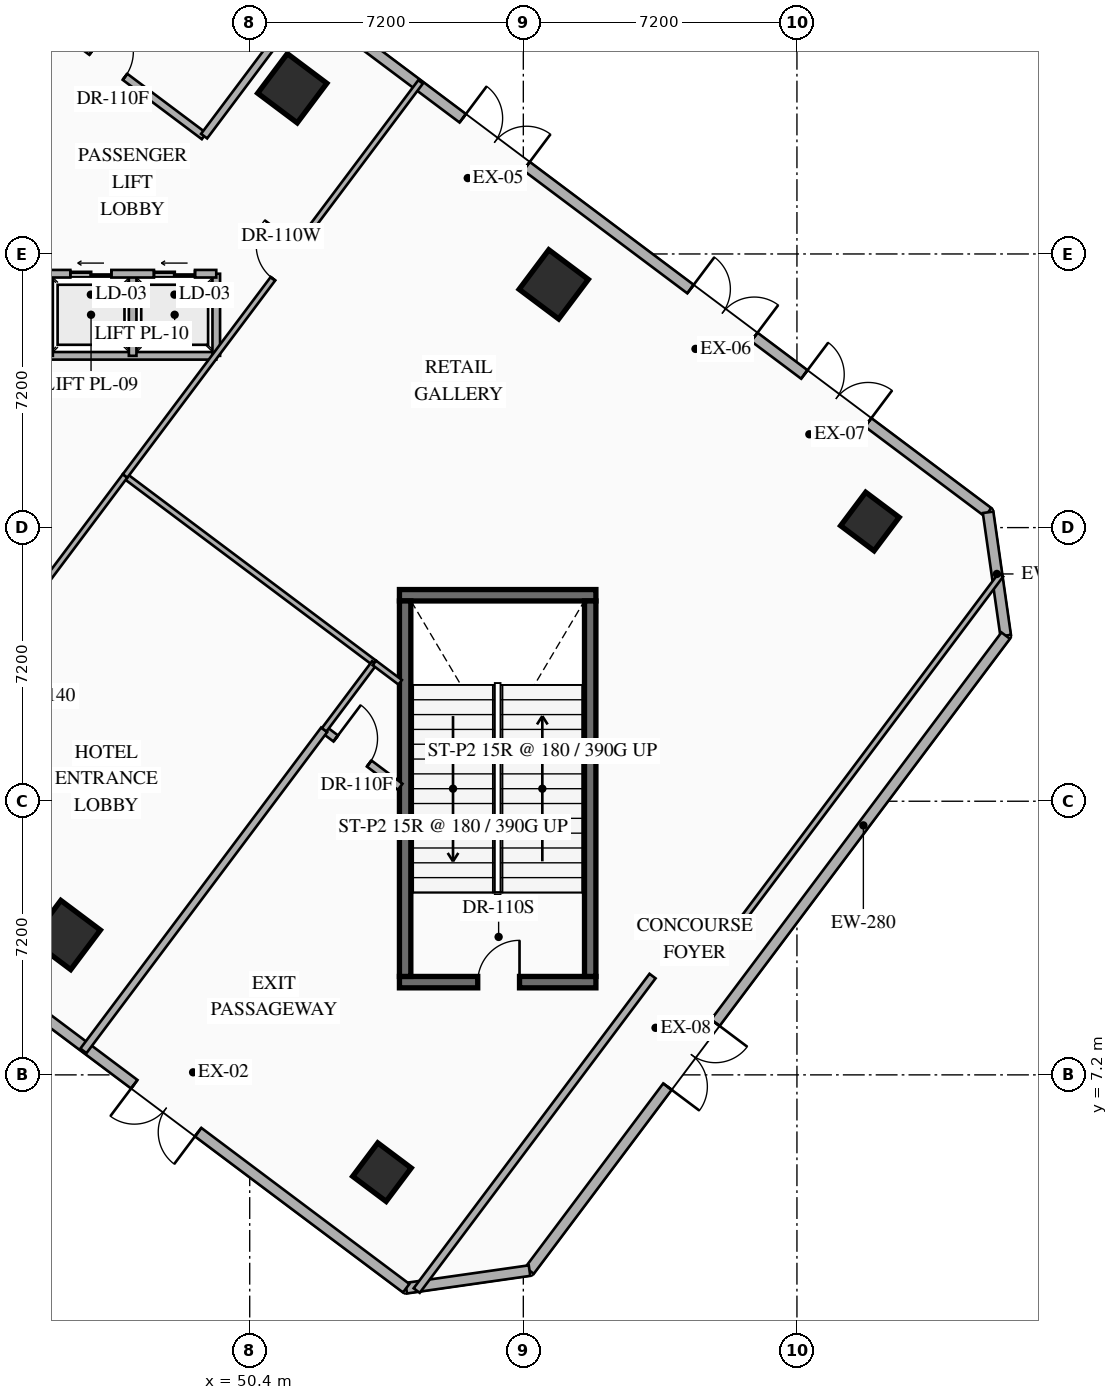
"""IFC4 building model, lengths in metres.
Left out: names, types, materials, properties, quantities, classifications, styles, units other than length and angle.
Written with IfcOpenShell. Run it as: python <this file> out.ifc"""

import sys

from ifc_helpers import new_model, si_unit, direction, frame, frame_2d, origin, origin_2d, place, context, subcontext, project, spatial, rectangle, hollow_rectangle, extrude, element, fill, save


model = new_model("IFC4")
c1 = context("Model", 3, precision=1e-05, world=origin(), true_north=direction((0.0, 1.0)))
c2 = subcontext(c1, "Body", "Model", "MODEL_VIEW")
j1 = project(units=[si_unit("LENGTHUNIT", "METRE"), si_unit("PLANEANGLEUNIT", "RADIAN")], contexts=[c1])
p1 = place(None, origin())
s1 = spatial("IfcSite", under=j1, at=p1, CompositionType="ELEMENT")
p2 = place(p1, origin())
s2 = spatial("IfcBuilding", under=s1, at=p2, CompositionType="ELEMENT")
p3 = place(p2, origin())
s3 = spatial("IfcBuildingStorey", under=s2, at=p3, CompositionType="ELEMENT", Elevation=0.0)
p4 = place(p3, frame((54.34, 9.64, 0.0), z_axis=(0.0, 0.0, 1.0), x_axis=(1.0, 0.0, 0.0)))
e1 = element("IfcWall", 1, at=p4, inside=s3, PredefinedType="SHEAR", context=c2, shape_type="SweptSolid", body=[
    extrude(rectangle(XDim=5.17, YDim=0.3, at=frame_2d((2.585, 0.0))), origin(), (0.0, 0.0, 1.0), 5.4),
])
p5 = place(p4, frame((2.06, 0.0, 0.0)))
e2 = element("IfcOpeningElement", 2, at=p5, cuts=e1, PredefinedType="OPENING", context=c2, shape_type="SweptSolid", body=[
    extrude(rectangle(XDim=1.1, YDim=2.2, at=frame_2d((0.55, 1.1))), frame((0.0, 0.16, 0.0), z_axis=(0.0, -1.0, 0.0), x_axis=(1.0, 0.0, 0.0)), (0.0, 0.0, 1.0), 0.32),
])
p6 = place(p3, frame((54.34, 19.82, 0.0), z_axis=(0.0, 0.0, 1.0), x_axis=(1.0, 0.0, 0.0)))
e3 = element("IfcWall", 3, at=p6, inside=s3, PredefinedType="SHEAR", context=c2, shape_type="SweptSolid", body=[
    extrude(rectangle(XDim=5.17, YDim=0.3, at=frame_2d((2.585, 0.0))), origin(), (0.0, 0.0, 1.0), 5.4),
])
for number, where, z_axis, x_axis in (
    (4, (54.49, 9.79, 0.0), (0.0, 0.0, 1.0), (0.0, 1.0, 0.0)),
    (5, (59.36, 9.79, 0.0), (0.0, 0.0, 1.0), (0.0, 1.0, 0.0)),
):
    element("IfcWall", number, at=place(p3, frame(where, z_axis=z_axis, x_axis=x_axis)), inside=s3, PredefinedType="SHEAR", context=c2, shape_type="SweptSolid", body=[
        extrude(rectangle(XDim=9.88, YDim=0.3, at=frame_2d((4.94, 0.0))), origin(), (0.0, 0.0, 1.0), 5.4),
    ])
for number, where, z_axis, x_axis in (
    (6, (51.52, 33.16, 0.0), (0.0, 0.0, 1.0), (0.8, -0.6, 0.0)),
    (7, (45.56, 10.88, 0.0), (0.0, 0.0, 1.0), (0.8, -0.6, 0.0)),
    (8, (58.4, 28.0, 0.0), (0.0, 0.0, 1.0), (0.8, -0.6, 0.0)),
):
    element("IfcColumn", number, at=place(p3, frame(where, z_axis=z_axis, x_axis=x_axis)), inside=s3, PredefinedType="COLUMN", context=c2, shape_type="SweptSolid", body=[
        extrude(rectangle(XDim=1.3, YDim=1.3, at=origin_2d()), origin(), (0.0, 0.0, 1.0), 5.4),
    ])
for number, where, z_axis, x_axis in (
    (9, (53.88, 4.64, 0.0), (0.0, 0.0, 1.0), (0.8, -0.6, 0.0)),
    (10, (66.72, 21.76, 0.0), (0.0, 0.0, 1.0), (0.8, -0.6, 0.0)),
):
    element("IfcColumn", number, at=place(p3, frame(where, z_axis=z_axis, x_axis=x_axis)), inside=s3, PredefinedType="COLUMN", context=c2, shape_type="SweptSolid", body=[
        extrude(hollow_rectangle(XDim=1.1, YDim=1.1, WallThickness=0.04, at=origin_2d()), origin(), (0.0, 0.0, 1.0), 5.4),
    ])
p7 = place(p3, frame((44.86, 40.73, 0.0), z_axis=(0.0, 0.0, 1.0), x_axis=(0.800006570398, -0.599991239369, 0.0)))
e11 = element("IfcWall", 11, at=p7, inside=s3, PredefinedType="STANDARD", context=c2, shape_type="SweptSolid", body=[
    extrude(rectangle(XDim=31.212, YDim=0.28, at=frame_2d((15.606, 0.0))), origin(), (0.0, 0.0, 1.0), 5.1),
])
p8 = place(p7, frame((4.5, 0.0, 0.0)))
e12 = element("IfcOpeningElement", 12, at=p8, cuts=e11, PredefinedType="OPENING", context=c2, shape_type="SweptSolid", body=[
    extrude(rectangle(XDim=2.1, YDim=2.3, at=frame_2d((1.05, 1.15))), frame((0.0, 0.15, 0.0), z_axis=(0.0, -1.0, 0.0), x_axis=(1.0, 0.0, 0.0)), (0.0, 0.0, 1.0), 0.3),
])
p9 = place(p7, frame((13.932, 0.0, 0.0)))
e13 = element("IfcOpeningElement", 13, at=p9, cuts=e11, PredefinedType="OPENING", context=c2, shape_type="SweptSolid", body=[
    extrude(rectangle(XDim=2.1, YDim=2.3, at=frame_2d((1.05, 1.15))), frame((0.0, 0.15, 0.0), z_axis=(0.0, -1.0, 0.0), x_axis=(1.0, 0.0, 0.0)), (0.0, 0.0, 1.0), 0.3),
])
p10 = place(p7, frame((21.423, 0.0, 0.0)))
e14 = element("IfcOpeningElement", 14, at=p10, cuts=e11, PredefinedType="OPENING", context=c2, shape_type="SweptSolid", body=[
    extrude(rectangle(XDim=2.1, YDim=2.3, at=frame_2d((1.05, 1.15))), frame((0.0, 0.15, 0.0), z_axis=(0.0, -1.0, 0.0), x_axis=(1.0, 0.0, 0.0)), (0.0, 0.0, 1.0), 0.3),
])
p11 = place(p7, frame((25.168, 0.0, 0.0)))
e15 = element("IfcOpeningElement", 15, at=p11, cuts=e11, PredefinedType="OPENING", context=c2, shape_type="SweptSolid", body=[
    extrude(rectangle(XDim=2.1, YDim=2.3, at=frame_2d((1.05, 1.15))), frame((0.0, 0.15, 0.0), z_axis=(0.0, -1.0, 0.0), x_axis=(1.0, 0.0, 0.0)), (0.0, 0.0, 1.0), 0.3),
])
p12 = place(p3, frame((69.83, 22.003, 0.0), z_axis=(0.0, 0.0, 1.0), x_axis=(0.141223223777, -0.989977778067, 0.0)))
e16 = element("IfcWall", 16, at=p12, inside=s3, PredefinedType="STANDARD", context=c2, shape_type="SweptSolid", body=[
    extrude(rectangle(XDim=3.278, YDim=0.28, at=frame_2d((1.639, 0.0))), origin(), (0.0, 0.0, 1.0), 5.1),
])
p13 = place(p3, frame((70.293, 18.758, 0.0), z_axis=(0.0, 0.0, 1.0), x_axis=(-0.599970072971, -0.800022444397, 0.0)))
e17 = element("IfcWall", 17, at=p13, inside=s3, PredefinedType="STANDARD", context=c2, shape_type="SweptSolid", body=[
    extrude(rectangle(XDim=20.885, YDim=0.28, at=frame_2d((10.442, 0.0))), origin(), (0.0, 0.0, 1.0), 5.1),
])
p14 = place(p13, frame((12.734, 0.0, 0.0)))
e18 = element("IfcOpeningElement", 18, at=p14, cuts=e17, PredefinedType="OPENING", context=c2, shape_type="SweptSolid", body=[
    extrude(rectangle(XDim=2.1, YDim=2.3, at=frame_2d((1.05, 1.15))), frame((0.0, 0.15, 0.0), z_axis=(0.0, -1.0, 0.0), x_axis=(1.0, 0.0, 0.0)), (0.0, 0.0, 1.0), 0.3),
])
p15 = place(p3, frame((57.763, 2.05, 0.0), z_axis=(0.0, 0.0, 1.0), x_axis=(-0.989967361922, -0.141296221922, 0.0)))
e19 = element("IfcWall", 19, at=p15, inside=s3, PredefinedType="STANDARD", context=c2, shape_type="SweptSolid", body=[
    extrude(rectangle(XDim=3.278, YDim=0.28, at=frame_2d((1.639, 0.0))), origin(), (0.0, 0.0, 1.0), 5.1),
])
p16 = place(p3, frame((54.518, 1.587, 0.0), z_axis=(0.0, 0.0, 1.0), x_axis=(-0.800001601415, 0.599997864774, 0.0)))
e20 = element("IfcWall", 20, at=p16, inside=s3, PredefinedType="STANDARD", context=c2, shape_type="SweptSolid", body=[
    extrude(rectangle(XDim=36.589, YDim=0.28, at=frame_2d((18.294, 0.0))), origin(), (0.0, 0.0, 1.0), 5.1),
])
p17 = place(p16, frame((6.844, 0.0, 0.0)))
e21 = element("IfcOpeningElement", 21, at=p17, cuts=e20, PredefinedType="OPENING", context=c2, shape_type="SweptSolid", body=[
    extrude(rectangle(XDim=2.1, YDim=2.3, at=frame_2d((1.05, 1.15))), frame((0.0, 0.15, 0.0), z_axis=(0.0, -1.0, 0.0), x_axis=(1.0, 0.0, 0.0)), (0.0, 0.0, 1.0), 0.3),
])
p18 = place(p16, frame((29.344, 0.0, 0.0)))
e22 = element("IfcOpeningElement", 22, at=p18, cuts=e20, PredefinedType="OPENING", context=c2, shape_type="SweptSolid", body=[
    extrude(rectangle(XDim=2.1, YDim=2.3, at=frame_2d((1.05, 1.15))), frame((0.0, 0.15, 0.0), z_axis=(0.0, -1.0, 0.0), x_axis=(1.0, 0.0, 0.0)), (0.0, 0.0, 1.0), 0.3),
])
p19 = place(p3, frame((45.12, 26.12, 0.0), z_axis=(0.0, 0.0, 1.0), x_axis=(1.0, 0.0, 0.0)))
e23 = element("IfcWall", 23, at=p19, inside=s3, PredefinedType="STANDARD", context=c2, shape_type="SweptSolid", body=[
    extrude(rectangle(XDim=4.4, YDim=0.2, at=frame_2d((2.2, 0.0))), origin(), (0.0, 0.0, 1.0), 5.1),
])
for number, where, z_axis, x_axis in (
    (24, (45.12, 26.12, 0.0), (0.0, 0.0, 1.0), (0.0, 1.0, 0.0)),
    (25, (49.52, 26.12, 0.0), (0.0, 0.0, 1.0), (0.0, 1.0, 0.0)),
    (26, (47.32, 26.12, 0.0), (0.0, 0.0, 1.0), (0.0, 1.0, 0.0)),
):
    element("IfcWall", number, at=place(p3, frame(where, z_axis=z_axis, x_axis=x_axis)), inside=s3, PredefinedType="STANDARD", context=c2, shape_type="SweptSolid", body=[
        extrude(rectangle(XDim=2.16, YDim=0.2, at=frame_2d((1.08, 0.0))), origin(), (0.0, 0.0, 1.0), 5.1),
    ])
p20 = place(p3, frame((45.12, 28.28, 0.0), z_axis=(0.0, 0.0, 1.0), x_axis=(1.0, 0.0, 0.0)))
e27 = element("IfcWall", 27, at=p20, inside=s3, PredefinedType="STANDARD", context=c2, shape_type="SweptSolid", body=[
    extrude(rectangle(XDim=4.4, YDim=0.2, at=frame_2d((2.2, 0.0))), origin(), (0.0, 0.0, 1.0), 5.1),
])
p21 = place(p20, frame((0.56, 0.0, 0.0)))
e28 = element("IfcOpeningElement", 28, at=p21, cuts=e27, PredefinedType="OPENING", context=c2, shape_type="SweptSolid", body=[
    extrude(rectangle(XDim=1.08, YDim=2.15, at=frame_2d((0.54, 1.075))), frame((0.0, 0.11, 0.0), z_axis=(0.0, -1.0, 0.0), x_axis=(1.0, 0.0, 0.0)), (0.0, 0.0, 1.0), 0.22),
])
p22 = place(p20, frame((2.76, 0.0, 0.0)))
e29 = element("IfcOpeningElement", 29, at=p22, cuts=e27, PredefinedType="OPENING", context=c2, shape_type="SweptSolid", body=[
    extrude(rectangle(XDim=1.08, YDim=2.15, at=frame_2d((0.54, 1.075))), frame((0.0, 0.11, 0.0), z_axis=(0.0, -1.0, 0.0), x_axis=(1.0, 0.0, 0.0)), (0.0, 0.0, 1.0), 0.22),
])
p23 = place(p3, frame((52.36, 16.28, 0.0), z_axis=(0.0, 0.0, 1.0), x_axis=(0.8, -0.6, 0.0)))
e30 = element("IfcWall", 30, at=p23, inside=s3, PredefinedType="STANDARD", context=c2, shape_type="SweptSolid", body=[
    extrude(rectangle(XDim=2.5, YDim=0.2, at=frame_2d((1.25, 0.0))), origin(), (0.0, 0.0, 1.0), 5.1),
])
p24 = place(p23, frame((0.38, 0.0, 0.0)))
e31 = element("IfcOpeningElement", 31, at=p24, cuts=e30, PredefinedType="OPENING", context=c2, shape_type="SweptSolid", body=[
    extrude(rectangle(XDim=1.1, YDim=2.24, at=frame_2d((0.55, 1.12))), frame((0.0, 0.11, 0.0), z_axis=(0.0, -1.0, 0.0), x_axis=(1.0, 0.0, 0.0)), (0.0, 0.0, 1.0), 0.22),
])
p25 = place(p3, frame((46.024, 7.832, 0.0), z_axis=(0.0, 0.0, 1.0), x_axis=(0.600011097131, 0.799991677032, 0.0)))
e32 = element("IfcWall", 32, at=p25, inside=s3, PredefinedType="STANDARD", context=c2, shape_type="SweptSolid", body=[
    extrude(rectangle(XDim=10.56, YDim=0.2, at=frame_2d((5.28, 0.0))), origin(), (0.0, 0.0, 1.0), 5.1),
])
p26 = place(p3, frame((54.794, 1.525, 0.0), z_axis=(0.0, 0.0, 1.0), x_axis=(0.599981117658, 0.800014161409, 0.0)))
e33 = element("IfcWall", 33, at=p26, inside=s3, PredefinedType="STANDARD", context=c2, shape_type="SweptSolid", body=[
    extrude(rectangle(XDim=10.344, YDim=0.2, at=frame_2d((5.172, 0.0))), origin(), (0.0, 0.0, 1.0), 5.1),
])
p27 = place(p3, frame((44.48, 35.44, 0.0), z_axis=(0.0, 0.0, 1.0), x_axis=(0.799995034401, -0.600006620742, 0.0)))
e34 = element("IfcWall", 34, at=p27, inside=s3, PredefinedType="STANDARD", context=c2, shape_type="SweptSolid", body=[
    extrude(rectangle(XDim=5.9, YDim=0.2, at=frame_2d((2.95, 0.0))), origin(), (0.0, 0.0, 1.0), 4.495),
])
p28 = place(p27, frame((2.198, 0.0, 0.0)))
e35 = element("IfcOpeningElement", 35, at=p28, cuts=e34, PredefinedType="OPENING", context=c2, shape_type="SweptSolid", body=[
    extrude(rectangle(XDim=1.1, YDim=2.24, at=frame_2d((0.55, 1.12))), frame((0.0, 0.11, 0.0), z_axis=(0.0, -1.0, 0.0), x_axis=(1.0, 0.0, 0.0)), (0.0, 0.0, 1.0), 0.22),
])
p29 = place(p3, frame((49.2, 31.9, 0.0), z_axis=(0.0, 0.0, 1.0), x_axis=(0.599991434013, 0.800006424419, 0.0)))
e36 = element("IfcWall", 36, at=p29, inside=s3, PredefinedType="STANDARD", context=c2, shape_type="SweptSolid", body=[
    extrude(rectangle(XDim=4.56, YDim=0.2, at=frame_2d((2.28, 0.0))), origin(), (0.0, 0.0, 1.0), 5.1),
])
p30 = place(p3, frame((47.12, 22.96, 0.0), z_axis=(0.0, 0.0, 1.0), x_axis=(0.799996427111, -0.600004763822, 0.0)))
e37 = element("IfcWall", 37, at=p30, inside=s3, PredefinedType="PARTITIONING", context=c2, shape_type="SweptSolid", body=[
    extrude(rectangle(XDim=8.2, YDim=0.15, at=frame_2d((4.1, 0.0))), origin(), (0.0, 0.0, 1.0), 5.1),
])
p31 = place(p3, frame((39.464, 12.752, 0.0), z_axis=(0.0, 0.0, 1.0), x_axis=(0.6, 0.8, 0.0)))
e38 = element("IfcWall", 38, at=p31, inside=s3, PredefinedType="PARTITIONING", context=c2, shape_type="SweptSolid", body=[
    extrude(rectangle(XDim=12.76, YDim=0.15, at=frame_2d((6.38, 0.0))), origin(), (0.0, 0.0, 1.0), 5.1),
])
p32 = place(p31, frame((5.68, 0.0, 0.0)))
e39 = element("IfcOpeningElement", 39, at=p32, cuts=e38, PredefinedType="OPENING", context=c2, shape_type="SweptSolid", body=[
    extrude(rectangle(XDim=1.4, YDim=2.3, at=frame_2d((0.7, 1.15))), frame((0.0, 0.085, 0.0), z_axis=(0.0, -1.0, 0.0), x_axis=(1.0, 0.0, 0.0)), (0.0, 0.0, 1.0), 0.17),
])
p33 = place(p3, frame((52.36, 16.28, 0.0), z_axis=(0.0, 0.0, 1.0), x_axis=(0.59994672926, 0.800039950284, 0.0)))
e40 = element("IfcWall", 40, at=p33, inside=s3, PredefinedType="PARTITIONING", context=c2, shape_type="SweptSolid", body=[
    extrude(rectangle(XDim=2.2, YDim=0.15, at=frame_2d((1.1, 0.0))), origin(), (0.0, 0.0, 1.0), 5.1),
])
p34 = place(p3, frame((53.68, 18.04, 0.0), z_axis=(0.0, 0.0, 1.0), x_axis=(0.800068916667, -0.599908100114, 0.0)))
e41 = element("IfcWall", 41, at=p34, inside=s3, PredefinedType="PARTITIONING", context=c2, shape_type="SweptSolid", body=[
    extrude(rectangle(XDim=0.85, YDim=0.15, at=frame_2d((0.425, 0.0))), origin(), (0.0, 0.0, 1.0), 5.1),
])
p35 = place(p3, frame((47.12, 22.96, 0.0), z_axis=(0.0, 0.0, 1.0), x_axis=(0.599996985882, 0.80000226058, 0.0)))
e42 = element("IfcWall", 42, at=p35, inside=s3, PredefinedType="PARTITIONING", context=c2, shape_type="SweptSolid", body=[
    extrude(rectangle(XDim=12.96, YDim=0.15, at=frame_2d((6.48, 0.0))), origin(), (0.0, 0.0, 1.0), 5.1),
])
p36 = place(p35, frame((6.485, 0.0, 0.0)))
e43 = element("IfcOpeningElement", 43, at=p36, cuts=e42, PredefinedType="OPENING", context=c2, shape_type="SweptSolid", body=[
    extrude(rectangle(XDim=1.1, YDim=2.16, at=frame_2d((0.55, 1.08))), frame((0.0, 0.085, 0.0), z_axis=(0.0, -1.0, 0.0), x_axis=(1.0, 0.0, 0.0)), (0.0, 0.0, 1.0), 0.17),
])
p37 = place(p3, frame((63.12, 10.96, 0.0), z_axis=(0.0, 0.0, 1.0), x_axis=(0.599980042057, 0.800014968068, 0.0)))
e44 = element("IfcWall", 44, at=p37, inside=s3, PredefinedType="PARTITIONING", context=c2, shape_type="SweptSolid", body=[
    extrude(rectangle(XDim=11.744, YDim=0.15, at=frame_2d((5.872, 0.0))), origin(), (0.0, 0.0, 1.0), 5.1),
])
p38 = place(p17, origin())
e45 = element("IfcDoor", 45, at=p38, inside=s3, OperationType="DOUBLE_SWING_LEFT", PredefinedType="DOOR", context=c2, shape_type="SweptSolid", body=[
    extrude(rectangle(XDim=2.1, YDim=2.3, at=frame_2d((1.05, 1.15))), frame((0.0, 0.025, 0.0), z_axis=(0.0, -1.0, 0.0), x_axis=(1.0, 0.0, 0.0)), (0.0, 0.0, 1.0), 0.05),
])
fill(e21, e45)
p39 = place(p9, origin())
e46 = element("IfcDoor", 46, at=p39, inside=s3, OperationType="DOUBLE_SWING_LEFT", PredefinedType="DOOR", context=c2, shape_type="SweptSolid", body=[
    extrude(rectangle(XDim=2.1, YDim=2.3, at=frame_2d((1.05, 1.15))), frame((0.0, 0.025, 0.0), z_axis=(0.0, -1.0, 0.0), x_axis=(1.0, 0.0, 0.0)), (0.0, 0.0, 1.0), 0.05),
])
fill(e13, e46)
p40 = place(p10, origin())
e47 = element("IfcDoor", 47, at=p40, inside=s3, OperationType="DOUBLE_SWING_LEFT", PredefinedType="DOOR", context=c2, shape_type="SweptSolid", body=[
    extrude(rectangle(XDim=2.1, YDim=2.3, at=frame_2d((1.05, 1.15))), frame((0.0, 0.025, 0.0), z_axis=(0.0, -1.0, 0.0), x_axis=(1.0, 0.0, 0.0)), (0.0, 0.0, 1.0), 0.05),
])
fill(e14, e47)
p41 = place(p11, origin())
e48 = element("IfcDoor", 48, at=p41, inside=s3, OperationType="DOUBLE_SWING_LEFT", PredefinedType="DOOR", context=c2, shape_type="SweptSolid", body=[
    extrude(rectangle(XDim=2.1, YDim=2.3, at=frame_2d((1.05, 1.15))), frame((0.0, 0.025, 0.0), z_axis=(0.0, -1.0, 0.0), x_axis=(1.0, 0.0, 0.0)), (0.0, 0.0, 1.0), 0.05),
])
fill(e15, e48)
p42 = place(p14, origin())
e49 = element("IfcDoor", 49, at=p42, inside=s3, OperationType="DOUBLE_SWING_LEFT", PredefinedType="DOOR", context=c2, shape_type="SweptSolid", body=[
    extrude(rectangle(XDim=2.1, YDim=2.3, at=frame_2d((1.05, 1.15))), frame((0.0, 0.025, 0.0), z_axis=(0.0, -1.0, 0.0), x_axis=(1.0, 0.0, 0.0)), (0.0, 0.0, 1.0), 0.05),
])
fill(e18, e49)
p43 = place(p5, origin())
e50 = element("IfcDoor", 50, at=p43, inside=s3, OperationType="SINGLE_SWING_RIGHT", PredefinedType="DOOR", context=c2, shape_type="SweptSolid", body=[
    extrude(rectangle(XDim=1.1, YDim=2.2, at=frame_2d((0.55, 1.1))), frame((0.0, 0.025, 0.0), z_axis=(0.0, -1.0, 0.0), x_axis=(1.0, 0.0, 0.0)), (0.0, 0.0, 1.0), 0.05),
])
fill(e2, e50)
p44 = place(p21, origin())
e51 = element("IfcDoor", 51, at=p44, inside=s3, OperationType="SLIDING_TO_LEFT", PredefinedType="USERDEFINED", context=c2, shape_type="SweptSolid", body=[
    extrude(rectangle(XDim=1.08, YDim=2.15, at=frame_2d((0.54, 1.075))), frame((0.0, 0.025, 0.0), z_axis=(0.0, -1.0, 0.0), x_axis=(1.0, 0.0, 0.0)), (0.0, 0.0, 1.0), 0.05),
])
fill(e28, e51)
p45 = place(p22, origin())
e52 = element("IfcDoor", 52, at=p45, inside=s3, OperationType="SLIDING_TO_LEFT", PredefinedType="USERDEFINED", context=c2, shape_type="SweptSolid", body=[
    extrude(rectangle(XDim=1.08, YDim=2.15, at=frame_2d((0.54, 1.075))), frame((0.0, 0.025, 0.0), z_axis=(0.0, -1.0, 0.0), x_axis=(1.0, 0.0, 0.0)), (0.0, 0.0, 1.0), 0.05),
])
fill(e29, e52)
p46 = place(p24, origin())
e53 = element("IfcDoor", 53, at=p46, inside=s3, OperationType="SINGLE_SWING_LEFT", PredefinedType="DOOR", context=c2, shape_type="SweptSolid", body=[
    extrude(rectangle(XDim=1.1, YDim=2.24, at=frame_2d((0.55, 1.12))), frame((0.0, 0.025, 0.0), z_axis=(0.0, -1.0, 0.0), x_axis=(1.0, 0.0, 0.0)), (0.0, 0.0, 1.0), 0.05),
])
fill(e31, e53)
p47 = place(p28, origin())
e54 = element("IfcDoor", 54, at=p47, inside=s3, OperationType="SINGLE_SWING_LEFT", PredefinedType="DOOR", context=c2, shape_type="SweptSolid", body=[
    extrude(rectangle(XDim=1.1, YDim=2.24, at=frame_2d((0.55, 1.12))), frame((0.0, 0.025, 0.0), z_axis=(0.0, -1.0, 0.0), x_axis=(1.0, 0.0, 0.0)), (0.0, 0.0, 1.0), 0.05),
])
fill(e35, e54)
p48 = place(p36, origin())
e55 = element("IfcDoor", 55, at=p48, inside=s3, OperationType="SINGLE_SWING_RIGHT", PredefinedType="DOOR", context=c2, shape_type="SweptSolid", body=[
    extrude(rectangle(XDim=1.1, YDim=2.16, at=frame_2d((0.55, 1.08))), frame((0.0, 0.025, 0.0), z_axis=(0.0, -1.0, 0.0), x_axis=(1.0, 0.0, 0.0)), (0.0, 0.0, 1.0), 0.05),
])
fill(e43, e55)
save(model, sys.argv[1])
